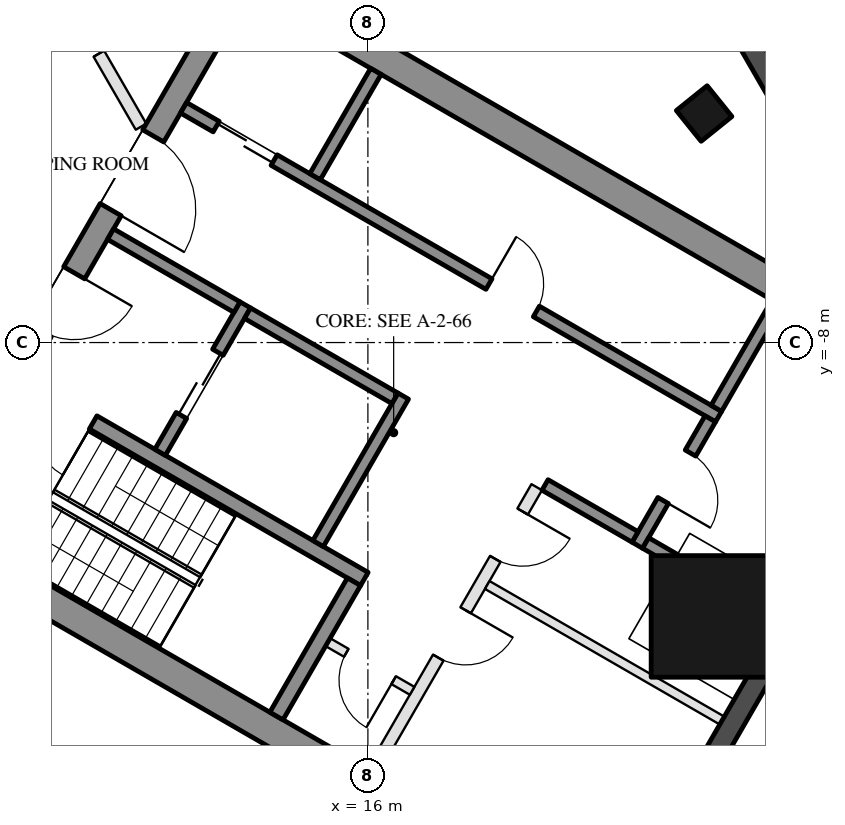
"""IFC4 building model, lengths in metres.
Left out: names, types, materials, properties, quantities, classifications, styles, units other than length and angle.
Written with IfcOpenShell. Run it as: python <this file> out.ifc"""

import sys

from ifc_helpers import new_model, si_unit, direction, frame, frame_2d, origin, origin_2d, place, context, subcontext, project, spatial, rectangle, hollow_rectangle, extrude, boolean, halfspace, element, fill, save


model = new_model("IFC4")
c1 = context("Model", 3, precision=1e-05, world=origin(), true_north=direction((0.0, 1.0)))
c2 = subcontext(c1, "Body", "Model", "MODEL_VIEW")
j1 = project(units=[si_unit("LENGTHUNIT", "METRE"), si_unit("PLANEANGLEUNIT", "RADIAN")], contexts=[c1])
p1 = place(None, origin())
s1 = spatial("IfcSite", under=j1, at=p1, CompositionType="ELEMENT")
p2 = place(p1, origin())
s2 = spatial("IfcBuilding", under=s1, at=p2, CompositionType="ELEMENT")
p3 = place(p2, frame((0.0, 0.0, 287.4)))
s3 = spatial("IfcBuildingStorey", under=s2, at=p3, CompositionType="ELEMENT", Elevation=287.4)
p4 = place(p3, frame((21.53, -4.233, 0.0), z_axis=(-0.190723355538, 0.02965081359, 0.981195918716), x_axis=(0.48832184533, -0.864229250401, 0.121035441609)))
e1 = element("IfcColumn", 1, at=p4, inside=s3, PredefinedType="COLUMN", context=c2, shape_type="SweptSolid", body=[
    boolean("DIFFERENCE", boolean("DIFFERENCE", extrude(hollow_rectangle(XDim=0.65, YDim=0.65, WallThickness=0.03, at=origin_2d()), origin(), (0.0, 0.0, 1.0), 3.771), halfspace(frame((0.0, 0.0, 0.047), z_axis=(0.0, 0.0, 1.0), x_axis=(1.0, 0.0, 0.0)), True)), halfspace(frame((0.0, 0.0, 3.724), z_axis=(0.0, 0.0, 1.0), x_axis=(1.0, 0.0, 0.0)), False)),
])
p5 = place(p3, frame((21.658, -12.504, 0.0), z_axis=(-0.19033286006, 0.109938628672, 0.975544412268), x_axis=(0.500170259217, 0.865927082262, 0.0)))
e2 = element("IfcColumn", 2, at=p5, inside=s3, PredefinedType="COLUMN", context=c2, shape_type="SweptSolid", body=[
    boolean("DIFFERENCE", boolean("DIFFERENCE", extrude(hollow_rectangle(XDim=2.0, YDim=2.0, WallThickness=0.05, at=origin_2d()), origin(), (0.0, 0.0, 1.0), 3.793), halfspace(frame((0.0, 0.0, 0.113), z_axis=(0.0, 0.0, 1.0), x_axis=(1.0, 0.0, 0.0)), True)), halfspace(frame((0.0, 0.0, 3.68), z_axis=(0.0, 0.0, 1.0), x_axis=(1.0, 0.0, 0.0)), False)),
])
p6 = place(p3, frame((21.384, -15.33, 0.0), z_axis=(0.0, 0.0, 1.0), x_axis=(0.500020983425, 0.866013288659, 0.0)))
e3 = element("IfcWall", 3, at=p6, inside=s3, PredefinedType="SOLIDWALL", context=c2, shape_type="SweptSolid", body=[
    extrude(rectangle(XDim=5.168, YDim=0.35, at=frame_2d((2.584, 0.0))), origin(), (0.0, 0.0, 1.0), 3.55),
])
p7 = place(p3, frame((23.968, -6.006, 0.0), z_axis=(0.0, 0.0, 1.0), x_axis=(-0.500008899612, 0.86602026553, 0.0)))
e4 = element("IfcWall", 4, at=p7, inside=s3, PredefinedType="SOLIDWALL", context=c2, shape_type="SweptSolid", body=[
    extrude(rectangle(XDim=10.87, YDim=0.35, at=frame_2d((5.435, 0.0))), origin(), (0.0, 0.0, 1.0), 3.55),
])
p8 = place(p7, frame((6.891, 0.0, 0.0)))
e5 = element("IfcOpeningElement", 5, at=p8, cuts=e4, PredefinedType="OPENING", context=c2, shape_type="SweptSolid", body=[
    extrude(rectangle(XDim=2.4, YDim=2.4, at=frame_2d((1.2, 1.2))), frame((0.0, 0.185, 0.0), z_axis=(0.0, -1.0, 0.0), x_axis=(1.0, 0.0, 0.0)), (0.0, 0.0, 1.0), 0.37),
])
p9 = place(p7, frame((3.892, 0.0, 0.3)))
e6 = element("IfcOpeningElement", 6, at=p9, cuts=e4, PredefinedType="OPENING", context=c2, shape_type="SweptSolid", body=[
    extrude(rectangle(XDim=2.6, YDim=2.65, at=frame_2d((1.3, 1.325))), frame((0.0, 0.185, 0.0), z_axis=(0.0, -1.0, 0.0), x_axis=(1.0, 0.0, 0.0)), (0.0, 0.0, 1.0), 0.37),
])
for number, where, z_axis, x_axis in (
    (7, (8.547, -10.997, 0.0), (0.0, 0.0, 1.0), (0.866, -0.5, 0.0)),
    (8, (13.797, -1.903, 0.0), (0.0, 0.0, 1.0), (0.866, -0.5, 0.0)),
):
    element("IfcWall", number, at=place(p3, frame(where, z_axis=z_axis, x_axis=x_axis)), inside=s3, PredefinedType="SHEAR", context=c2, shape_type="SweptSolid", body=[
        extrude(rectangle(XDim=12.129, YDim=0.5, at=frame_2d((6.064, 0.0))), origin(), (0.0, 0.0, 1.0), 3.5),
    ])
p10 = place(p3, frame((8.845, -10.88, 0.0), z_axis=(0.0, 0.0, 1.0), x_axis=(0.500004234368, 0.866022959057, 0.0)))
e9 = element("IfcWall", 9, at=p10, inside=s3, PredefinedType="SHEAR", context=c2, shape_type="SweptSolid", body=[
    extrude(rectangle(XDim=10.0, YDim=0.4, at=frame_2d((5.0, 0.0))), origin(), (0.0, 0.0, 1.0), 3.5),
])
p11 = place(p10, frame((3.55, 0.0, 0.0)))
e10 = element("IfcOpeningElement", 10, at=p11, cuts=e9, PredefinedType="OPENING", context=c2, shape_type="SweptSolid", body=[
    extrude(rectangle(XDim=1.1, YDim=2.1, at=frame_2d((0.55, 1.05))), frame((0.0, 0.21, 0.0), z_axis=(0.0, -1.0, 0.0), x_axis=(1.0, 0.0, 0.0)), (0.0, 0.0, 1.0), 0.42),
])
p12 = place(p10, frame((5.85, 0.0, 0.0)))
e11 = element("IfcOpeningElement", 11, at=p12, cuts=e9, PredefinedType="OPENING", context=c2, shape_type="SweptSolid", body=[
    extrude(rectangle(XDim=1.4, YDim=2.1, at=frame_2d((0.7, 1.05))), frame((0.0, 0.21, 0.0), z_axis=(0.0, -1.0, 0.0), x_axis=(1.0, 0.0, 0.0)), (0.0, 0.0, 1.0), 0.42),
])
p13 = place(p3, frame((10.356, -8.664, 0.0), z_axis=(0.0, 0.0, 1.0), x_axis=(0.866028629588, -0.499994412703, 0.0)))
e12 = element("IfcWall", 12, at=p13, inside=s3, PredefinedType="SHEAR", context=c2, shape_type="SweptSolid", body=[
    extrude(rectangle(XDim=6.45, YDim=0.25, at=frame_2d((3.225, 0.0))), origin(), (0.0, 0.0, 1.0), 3.5),
])
p14 = place(p13, frame((0.3, 0.0, 0.0)))
e13 = element("IfcOpeningElement", 13, at=p14, cuts=e12, PredefinedType="OPENING", context=c2, shape_type="SweptSolid", body=[
    extrude(rectangle(XDim=1.0, YDim=2.1, at=frame_2d((0.5, 1.05))), frame((0.0, 0.135, 0.0), z_axis=(0.0, -1.0, 0.0), x_axis=(1.0, 0.0, 0.0)), (0.0, 0.0, 1.0), 0.27),
])
p15 = place(p3, frame((14.496, -14.143, 0.0), z_axis=(0.0, 0.0, 1.0), x_axis=(0.500062241894, 0.865989465428, 0.0)))
e14 = element("IfcWall", 14, at=p15, inside=s3, PredefinedType="SHEAR", context=c2, shape_type="SweptSolid", body=[
    extrude(rectangle(XDim=2.55, YDim=0.25, at=frame_2d((1.275, 0.0))), origin(), (0.0, 0.0, 1.0), 3.5),
])
p16 = place(p3, frame((15.181, -11.305, 0.0), z_axis=(0.0, 0.0, 1.0), x_axis=(0.49994636267, 0.866056369097, 0.0)))
e15 = element("IfcWall", 15, at=p16, inside=s3, PredefinedType="SHEAR", context=c2, shape_type="SweptSolid", body=[
    extrude(rectangle(XDim=2.8, YDim=0.2, at=frame_2d((1.4, 0.0))), origin(), (0.0, 0.0, 1.0), 3.5),
])
p17 = place(p3, frame((12.583, -9.805, 0.0), z_axis=(0.0, 0.0, 1.0), x_axis=(0.49994636267, 0.866056369097, 0.0)))
e16 = element("IfcWall", 16, at=p17, inside=s3, PredefinedType="SHEAR", context=c2, shape_type="SweptSolid", body=[
    extrude(rectangle(XDim=2.8, YDim=0.2, at=frame_2d((1.4, 0.0))), origin(), (0.0, 0.0, 1.0), 3.5),
])
p18 = place(p17, frame((0.7, 0.0, 0.0)))
e17 = element("IfcOpeningElement", 17, at=p18, cuts=e16, PredefinedType="OPENING", context=c2, shape_type="SweptSolid", body=[
    extrude(rectangle(XDim=1.2, YDim=2.1, at=frame_2d((0.6, 1.05))), frame((0.0, 0.11, 0.0), z_axis=(0.0, -1.0, 0.0), x_axis=(1.0, 0.0, 0.0)), (0.0, 0.0, 1.0), 0.22),
])
p19 = place(p3, frame((11.768, -6.217, 0.0), z_axis=(0.0, 0.0, 1.0), x_axis=(0.866050077142, -0.499957262057, 0.0)))
e18 = element("IfcWall", 18, at=p19, inside=s3, PredefinedType="SHEAR", context=c2, shape_type="SweptSolid", body=[
    extrude(rectangle(XDim=2.4, YDim=0.2, at=frame_2d((1.2, 0.0))), origin(), (0.0, 0.0, 1.0), 3.5),
])
p20 = place(p3, frame((14.02, -7.517, 0.0), z_axis=(0.0, 0.0, 1.0), x_axis=(0.866034573852, -0.49998411664, 0.0)))
e19 = element("IfcWall", 19, at=p20, inside=s3, PredefinedType="SHEAR", context=c2, shape_type="SweptSolid", body=[
    extrude(rectangle(XDim=2.8, YDim=0.2, at=frame_2d((1.4, 0.0))), origin(), (0.0, 0.0, 1.0), 3.5),
])
p21 = place(p3, frame((12.968, -4.138, 0.0), z_axis=(0.0, 0.0, 1.0), x_axis=(0.866028328073, -0.49999493495, 0.0)))
e20 = element("IfcWall", 20, at=p21, inside=s3, PredefinedType="SHEAR", context=c2, shape_type="SweptSolid", body=[
    extrude(rectangle(XDim=10.16, YDim=0.2, at=frame_2d((5.08, 0.0))), origin(), (0.0, 0.0, 1.0), 3.5),
])
p22 = place(p21, frame((0.62, 0.0, 0.0)))
e21 = element("IfcOpeningElement", 21, at=p22, cuts=e20, PredefinedType="OPENING", context=c2, shape_type="SweptSolid", body=[
    extrude(rectangle(XDim=1.1, YDim=2.1, at=frame_2d((0.55, 1.05))), frame((0.0, 0.11, 0.0), z_axis=(0.0, -1.0, 0.0), x_axis=(1.0, 0.0, 0.0)), (0.0, 0.0, 1.0), 0.22),
])
p23 = place(p21, frame((5.8, 0.0, 0.0)))
e22 = element("IfcOpeningElement", 22, at=p23, cuts=e20, PredefinedType="OPENING", context=c2, shape_type="SweptSolid", body=[
    extrude(rectangle(XDim=0.9, YDim=2.1, at=frame_2d((0.45, 1.05))), frame((0.0, 0.11, 0.0), z_axis=(0.0, -1.0, 0.0), x_axis=(1.0, 0.0, 0.0)), (0.0, 0.0, 1.0), 0.22),
])
p24 = place(p3, frame((20.43, -11.333, 0.0), z_axis=(0.0, 0.0, 1.0), x_axis=(0.500001309137, 0.866024647952, 0.0)))
e23 = element("IfcWall", 23, at=p24, inside=s3, PredefinedType="SHEAR", context=c2, shape_type="SweptSolid", body=[
    extrude(rectangle(XDim=2.4, YDim=0.2, at=frame_2d((1.2, 0.0))), origin(), (0.0, 0.0, 1.0), 3.5),
])
p25 = place(p24, frame((0.85, 0.0, 0.0)))
e24 = element("IfcOpeningElement", 24, at=p25, cuts=e23, PredefinedType="OPENING", context=c2, shape_type="SweptSolid", body=[
    extrude(rectangle(XDim=0.9, YDim=2.1, at=frame_2d((0.45, 1.05))), frame((0.0, 0.11, 0.0), z_axis=(0.0, -1.0, 0.0), x_axis=(1.0, 0.0, 0.0)), (0.0, 0.0, 1.0), 0.22),
])
p26 = place(p3, frame((18.913, -10.342, 0.0), z_axis=(0.0, 0.0, 1.0), x_axis=(0.866038183914, -0.499977863513, 0.0)))
e25 = element("IfcWall", 25, at=p26, inside=s3, PredefinedType="SHEAR", context=c2, shape_type="SweptSolid", body=[
    extrude(rectangle(XDim=1.71, YDim=0.2, at=frame_2d((0.855, 0.0))), origin(), (0.0, 0.0, 1.0), 3.5),
])
for number, where, z_axis, x_axis in (
    (26, (15.131, -5.272, 0.0), (0.0, 0.0, 1.0), (0.5, 0.866, 0.0)),
    (27, (21.73, -9.082, 0.0), (0.0, 0.0, 1.0), (0.5, 0.866, 0.0)),
):
    element("IfcWall", number, at=place(p3, frame(where, z_axis=z_axis, x_axis=x_axis)), inside=s3, PredefinedType="SHEAR", context=c2, shape_type="SweptSolid", body=[
        extrude(rectangle(XDim=2.0, YDim=0.2, at=frame_2d((1.0, 0.0))), origin(), (0.0, 0.0, 1.0), 3.5),
    ])
p27 = place(p3, frame((20.567, -11.297, 0.0), z_axis=(0.0, 0.0, 1.0), x_axis=(0.866237429803, -0.49963258021, 0.0)))
e28 = element("IfcWall", 28, at=p27, inside=s3, PredefinedType="SHEAR", context=c2, shape_type="SweptSolid", body=[
    extrude(rectangle(XDim=0.549, YDim=0.2, at=frame_2d((0.274, 0.0))), origin(), (0.0, 0.0, 1.0), 3.5),
])
p28 = place(p3, frame((16.076, -15.055, 0.0), z_axis=(0.0, 0.0, 1.0), x_axis=(0.499995103361, 0.866028230842, 0.0)))
e29 = element("IfcWall", 29, at=p28, inside=s3, PredefinedType="PARTITIONING", context=c2, shape_type="SweptSolid", body=[
    extrude(rectangle(XDim=5.4, YDim=0.2, at=frame_2d((2.7, 0.0))), origin(), (0.0, 0.0, 1.0), 3.5),
])
p29 = place(p28, frame((2.163, 0.0, 0.0)))
e30 = element("IfcOpeningElement", 30, at=p29, cuts=e29, PredefinedType="OPENING", context=c2, shape_type="SweptSolid", body=[
    extrude(rectangle(XDim=0.9, YDim=2.1, at=frame_2d((0.45, 1.05))), frame((0.0, 0.11, 0.0), z_axis=(0.0, -1.0, 0.0), x_axis=(1.0, 0.0, 0.0)), (0.0, 0.0, 1.0), 0.22),
])
p30 = place(p28, frame((4.038, 0.0, 0.0)))
e31 = element("IfcOpeningElement", 31, at=p30, cuts=e29, PredefinedType="OPENING", context=c2, shape_type="SweptSolid", body=[
    extrude(rectangle(XDim=0.9, YDim=2.1, at=frame_2d((0.45, 1.05))), frame((0.0, 0.11, 0.0), z_axis=(0.0, -1.0, 0.0), x_axis=(1.0, 0.0, 0.0)), (0.0, 0.0, 1.0), 0.22),
])
p31 = place(p3, frame((15.342, -12.928, 0.0), z_axis=(0.0, 0.0, 1.0), x_axis=(0.865989903783, -0.500061482766, 0.0)))
e32 = element("IfcWall", 32, at=p31, inside=s3, PredefinedType="PARTITIONING", context=c2, shape_type="SweptSolid", body=[
    extrude(rectangle(XDim=1.6, YDim=0.15, at=frame_2d((0.8, 0.0))), origin(), (0.0, 0.0, 1.0), 3.5),
])
p32 = place(p31, frame((0.35, 0.0, 0.0)))
e33 = element("IfcOpeningElement", 33, at=p32, cuts=e32, PredefinedType="OPENING", context=c2, shape_type="SweptSolid", body=[
    extrude(rectangle(XDim=0.9, YDim=2.1, at=frame_2d((0.45, 1.05))), frame((0.0, 0.085, 0.0), z_axis=(0.0, -1.0, 0.0), x_axis=(1.0, 0.0, 0.0)), (0.0, 0.0, 1.0), 0.17),
])
p33 = place(p3, frame((17.963, -11.987, 0.0), z_axis=(0.0, 0.0, 1.0), x_axis=(0.866010510293, -0.500025795397, 0.0)))
e34 = element("IfcWall", 34, at=p33, inside=s3, PredefinedType="PARTITIONING", context=c2, shape_type="SweptSolid", body=[
    extrude(rectangle(XDim=4.459, YDim=0.15, at=frame_2d((2.229, 0.0))), origin(), (0.0, 0.0, 1.0), 3.5),
])
p34 = place(p3, frame((10.382, -1.182, 0.0), z_axis=(0.0, 0.0, 1.0), x_axis=(0.50002859319, -0.866008894869, 0.0)))
e35 = element("IfcWall", 35, at=p34, inside=s3, PredefinedType="PARTITIONING", context=c2, shape_type="SweptSolid", body=[
    extrude(rectangle(XDim=3.774, YDim=0.2, at=frame_2d((1.887, 0.0))), origin(), (0.0, 0.0, 1.0), 3.05),
])
p35 = place(p34, frame((1.387, 0.0, 0.0)))
e36 = element("IfcOpeningElement", 36, at=p35, cuts=e35, PredefinedType="OPENING", context=c2, shape_type="SweptSolid", body=[
    extrude(rectangle(XDim=1.0, YDim=2.1, at=frame_2d((0.5, 1.05))), frame((0.0, 0.11, 0.0), z_axis=(0.0, -1.0, 0.0), x_axis=(1.0, 0.0, 0.0)), (0.0, 0.0, 1.0), 0.22),
])
p36 = place(p18, origin())
e37 = element("IfcDoor", 37, at=p36, inside=s3, OperationType="DOUBLE_DOOR_SLIDING", PredefinedType="DOOR", context=c2, shape_type="SweptSolid", body=[
    extrude(rectangle(XDim=1.2, YDim=2.1, at=frame_2d((0.6, 1.05))), frame((0.0, 0.025, 0.0), z_axis=(0.0, -1.0, 0.0), x_axis=(1.0, 0.0, 0.0)), (0.0, 0.0, 1.0), 0.05),
])
fill(e17, e37)
p37 = place(p32, frame((0.9, 0.0, 0.0), z_axis=(0.0, 0.0, 1.0), x_axis=(-1.0, 0.0, 0.0)))
e38 = element("IfcDoor", 38, at=p37, inside=s3, OperationType="SINGLE_SWING_LEFT", PredefinedType="DOOR", context=c2, shape_type="SweptSolid", body=[
    extrude(rectangle(XDim=0.9, YDim=2.1, at=frame_2d((0.45, 1.05))), frame((0.0, 0.025, 0.0), z_axis=(0.0, -1.0, 0.0), x_axis=(1.0, 0.0, 0.0)), (0.0, 0.0, 1.0), 0.05),
])
fill(e33, e38)
p38 = place(p22, origin())
e39 = element("IfcDoor", 39, at=p38, inside=s3, OperationType="DOUBLE_DOOR_SLIDING", PredefinedType="DOOR", context=c2, shape_type="SweptSolid", body=[
    extrude(rectangle(XDim=1.1, YDim=2.1, at=frame_2d((0.55, 1.05))), frame((0.0, 0.025, 0.0), z_axis=(0.0, -1.0, 0.0), x_axis=(1.0, 0.0, 0.0)), (0.0, 0.0, 1.0), 0.05),
])
fill(e21, e39)
p39 = place(p23, origin())
e40 = element("IfcDoor", 40, at=p39, inside=s3, OperationType="SINGLE_SWING_LEFT", PredefinedType="DOOR", context=c2, shape_type="SweptSolid", body=[
    extrude(rectangle(XDim=0.9, YDim=2.1, at=frame_2d((0.45, 1.05))), frame((0.0, 0.025, 0.0), z_axis=(0.0, -1.0, 0.0), x_axis=(1.0, 0.0, 0.0)), (0.0, 0.0, 1.0), 0.05),
])
fill(e22, e40)
p40 = place(p25, frame((0.9, 0.0, 0.0), z_axis=(0.0, 0.0, 1.0), x_axis=(-1.0, 0.0, 0.0)))
e41 = element("IfcDoor", 41, at=p40, inside=s3, OperationType="SINGLE_SWING_RIGHT", PredefinedType="DOOR", context=c2, shape_type="SweptSolid", body=[
    extrude(rectangle(XDim=0.9, YDim=2.1, at=frame_2d((0.45, 1.05))), frame((0.0, 0.025, 0.0), z_axis=(0.0, -1.0, 0.0), x_axis=(1.0, 0.0, 0.0)), (0.0, 0.0, 1.0), 0.05),
])
fill(e24, e41)
p41 = place(p29, frame((0.9, 0.0, 0.0), z_axis=(0.0, 0.0, 1.0), x_axis=(-1.0, 0.0, 0.0)))
e42 = element("IfcDoor", 42, at=p41, inside=s3, OperationType="SINGLE_SWING_LEFT", PredefinedType="DOOR", context=c2, shape_type="SweptSolid", body=[
    extrude(rectangle(XDim=0.9, YDim=2.1, at=frame_2d((0.45, 1.05))), frame((0.0, 0.025, 0.0), z_axis=(0.0, -1.0, 0.0), x_axis=(1.0, 0.0, 0.0)), (0.0, 0.0, 1.0), 0.05),
])
fill(e30, e42)
p42 = place(p30, frame((0.9, 0.0, 0.0), z_axis=(0.0, 0.0, 1.0), x_axis=(-1.0, 0.0, 0.0)))
e43 = element("IfcDoor", 43, at=p42, inside=s3, OperationType="SINGLE_SWING_LEFT", PredefinedType="DOOR", context=c2, shape_type="SweptSolid", body=[
    extrude(rectangle(XDim=0.9, YDim=2.1, at=frame_2d((0.45, 1.05))), frame((0.0, 0.025, 0.0), z_axis=(0.0, -1.0, 0.0), x_axis=(1.0, 0.0, 0.0)), (0.0, 0.0, 1.0), 0.05),
])
fill(e31, e43)
p43 = place(p11, frame((1.1, 0.0, 0.0), z_axis=(0.0, 0.0, 1.0), x_axis=(-1.0, 0.0, 0.0)))
e44 = element("IfcDoor", 44, at=p43, inside=s3, OperationType="SINGLE_SWING_LEFT", PredefinedType="DOOR", context=c2, shape_type="SweptSolid", body=[
    extrude(rectangle(XDim=1.1, YDim=2.1, at=frame_2d((0.55, 1.05))), frame((0.0, 0.025, 0.0), z_axis=(0.0, -1.0, 0.0), x_axis=(1.0, 0.0, 0.0)), (0.0, 0.0, 1.0), 0.05),
])
fill(e10, e44)
p44 = place(p12, frame((1.4, 0.0, 0.0), z_axis=(0.0, 0.0, 1.0), x_axis=(-1.0, 0.0, 0.0)))
e45 = element("IfcDoor", 45, at=p44, inside=s3, OperationType="DOUBLE_DOOR_SINGLE_SWING", PredefinedType="DOOR", context=c2, shape_type="SweptSolid", body=[
    extrude(rectangle(XDim=1.4, YDim=2.1, at=frame_2d((0.7, 1.05))), frame((0.0, 0.025, 0.0), z_axis=(0.0, -1.0, 0.0), x_axis=(1.0, 0.0, 0.0)), (0.0, 0.0, 1.0), 0.05),
])
fill(e11, e45)
p45 = place(p14, frame((1.0, 0.0, 0.0), z_axis=(0.0, 0.0, 1.0), x_axis=(-1.0, 0.0, 0.0)))
e46 = element("IfcDoor", 46, at=p45, inside=s3, OperationType="SINGLE_SWING_LEFT", PredefinedType="DOOR", context=c2, shape_type="SweptSolid", body=[
    extrude(rectangle(XDim=1.0, YDim=2.1, at=frame_2d((0.5, 1.05))), frame((0.0, 0.025, 0.0), z_axis=(0.0, -1.0, 0.0), x_axis=(1.0, 0.0, 0.0)), (0.0, 0.0, 1.0), 0.05),
])
fill(e13, e46)
p46 = place(p35, origin())
e47 = element("IfcDoor", 47, at=p46, inside=s3, OperationType="SINGLE_SWING_LEFT", PredefinedType="DOOR", context=c2, shape_type="SweptSolid", body=[
    extrude(rectangle(XDim=1.0, YDim=2.1, at=frame_2d((0.5, 1.05))), frame((0.0, 0.025, 0.0), z_axis=(0.0, -1.0, 0.0), x_axis=(1.0, 0.0, 0.0)), (0.0, 0.0, 1.0), 0.05),
])
fill(e36, e47)
save(model, sys.argv[1])
